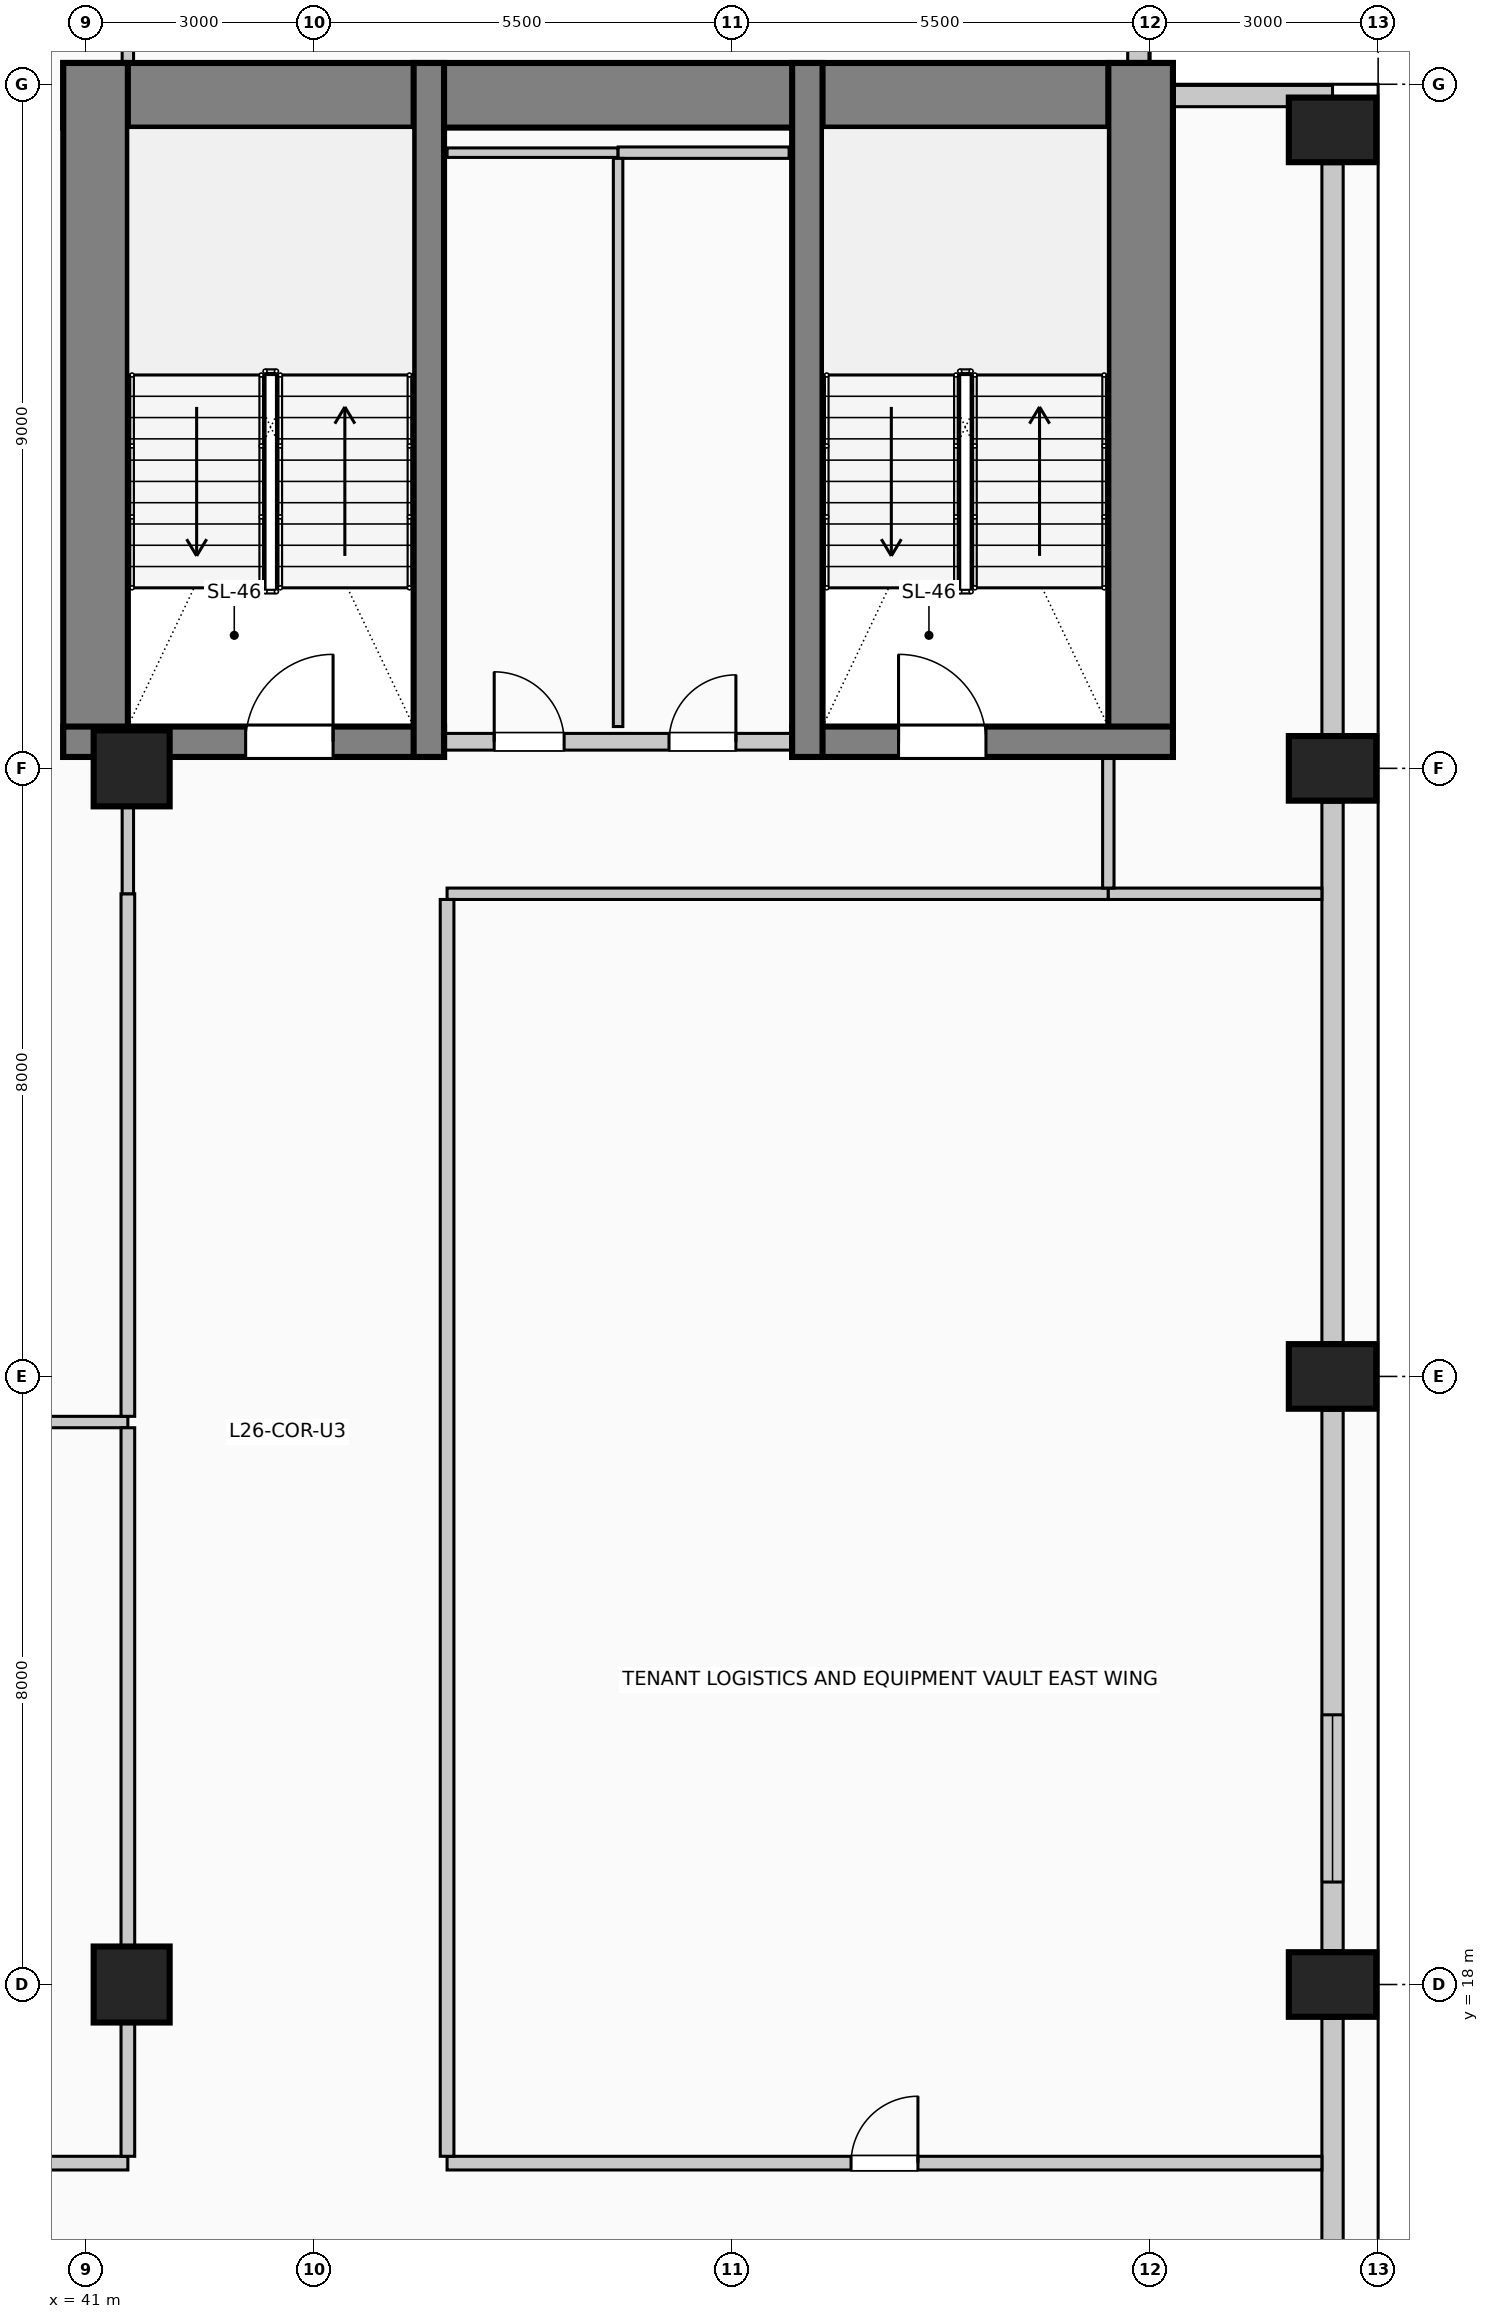
"""IFC4 building model, lengths in metres.
Left out: names, types, materials, properties, quantities, classifications, styles, units other than length and angle.
Written with IfcOpenShell. Run it as: python <this file> out.ifc"""

import sys

from ifc_helpers import new_model, si_unit, direction, frame, frame_2d, origin, origin_2d, place, context, subcontext, project, spatial, rectangle, circle, extrude, element, fill, save


model = new_model("IFC4")
c1 = context("Model", 3, precision=1e-05, world=origin(), true_north=direction((0.0, 1.0)))
c2 = subcontext(c1, "Body", "Model", "MODEL_VIEW")
j1 = project(units=[si_unit("LENGTHUNIT", "METRE"), si_unit("PLANEANGLEUNIT", "RADIAN")], contexts=[c1])
p1 = place(None, origin())
s1 = spatial("IfcSite", under=j1, at=p1, CompositionType="ELEMENT")
p2 = place(p1, origin())
s2 = spatial("IfcBuilding", under=s1, at=p2, CompositionType="ELEMENT")
p3 = place(p2, frame((0.0, 0.0, 108.6)))
s3 = spatial("IfcBuildingStorey", under=s2, at=p3, CompositionType="ELEMENT", Elevation=108.6)
p4 = place(p3, frame((40.7, 42.855, 0.0), z_axis=(0.0, 0.0, 1.0), x_axis=(1.0, 0.0, 0.0)))
e1 = element("IfcWall", 1, at=p4, inside=s3, PredefinedType="SHEAR", context=c2, shape_type="SweptSolid", body=[
    extrude(rectangle(XDim=14.6, YDim=0.85, at=frame_2d((7.3, 0.0))), origin(), (0.0, 0.0, 1.0), 4.0),
])
for number, where, z_axis, x_axis in (
    (2, (41.125, 34.15, 0.0), (0.0, 0.0, 1.0), (0.0, 1.0, 0.0)),
    (3, (54.875, 34.15, 0.0), (0.0, 0.0, 1.0), (0.0, 1.0, 0.0)),
):
    element("IfcWall", number, at=place(p3, frame(where, z_axis=z_axis, x_axis=x_axis)), inside=s3, PredefinedType="SHEAR", context=c2, shape_type="SweptSolid", body=[
        extrude(rectangle(XDim=9.13, YDim=0.85, at=frame_2d((4.565, 0.0))), origin(), (0.0, 0.0, 1.0), 4.0),
    ])
p5 = place(p3, frame((40.7, 34.35, 0.0), z_axis=(0.0, 0.0, 1.0), x_axis=(1.0, 0.0, 0.0)))
e4 = element("IfcWall", 4, at=p5, inside=s3, PredefinedType="SHEAR", context=c2, shape_type="SweptSolid", body=[
    extrude(rectangle(XDim=5.01, YDim=0.4, at=frame_2d((2.505, 0.0))), origin(), (0.0, 0.0, 1.0), 4.0),
])
p6 = place(p5, frame((2.4, 0.0, 0.0)))
e5 = element("IfcOpeningElement", 5, at=p6, cuts=e4, PredefinedType="OPENING", context=c2, shape_type="SweptSolid", body=[
    extrude(rectangle(XDim=1.15, YDim=2.2, at=frame_2d((0.575, 1.1))), frame((0.0, 0.21, 0.0), z_axis=(0.0, -1.0, 0.0), x_axis=(1.0, 0.0, 0.0)), (0.0, 0.0, 1.0), 0.42),
])
p7 = place(p3, frame((45.51, 34.15, 0.0), z_axis=(0.0, 0.0, 1.0), x_axis=(0.0, 1.0, 0.0)))
e6 = element("IfcWall", 6, at=p7, inside=s3, PredefinedType="SHEAR", context=c2, shape_type="SweptSolid", body=[
    extrude(rectangle(XDim=9.13, YDim=0.4, at=frame_2d((4.565, 0.0))), origin(), (0.0, 0.0, 1.0), 4.0),
])
p8 = place(p3, frame((50.29, 34.35, 0.0), z_axis=(0.0, 0.0, 1.0), x_axis=(1.0, 0.0, 0.0)))
e7 = element("IfcWall", 7, at=p8, inside=s3, PredefinedType="SHEAR", context=c2, shape_type="SweptSolid", body=[
    extrude(rectangle(XDim=5.01, YDim=0.4, at=frame_2d((2.505, 0.0))), origin(), (0.0, 0.0, 1.0), 4.0),
])
p9 = place(p8, frame((1.4, 0.0, 0.0)))
e8 = element("IfcOpeningElement", 8, at=p9, cuts=e7, PredefinedType="OPENING", context=c2, shape_type="SweptSolid", body=[
    extrude(rectangle(XDim=1.15, YDim=2.2, at=frame_2d((0.575, 1.1))), frame((0.0, 0.21, 0.0), z_axis=(0.0, -1.0, 0.0), x_axis=(1.0, 0.0, 0.0)), (0.0, 0.0, 1.0), 0.42),
])
p10 = place(p3, frame((50.49, 34.15, 0.0), z_axis=(0.0, 0.0, 1.0), x_axis=(0.0, 1.0, 0.0)))
e9 = element("IfcWall", 9, at=p10, inside=s3, PredefinedType="SHEAR", context=c2, shape_type="SweptSolid", body=[
    extrude(rectangle(XDim=9.13, YDim=0.4, at=frame_2d((4.565, 0.0))), origin(), (0.0, 0.0, 1.0), 4.0),
])
for number, where, z_axis, x_axis in (
    (10, (57.4, 18.0, 0.0), (0.0, 0.0, 1.0), (0.0, 1.0, 0.0)),
    (11, (57.4, 26.0, 0.0), (0.0, 0.0, 1.0), (0.0, 1.0, 0.0)),
    (12, (57.4, 34.0, 0.0), (0.0, 0.0, 1.0), (0.0, 1.0, 0.0)),
    (13, (57.4, 42.4, 0.0), (0.0, 0.0, 1.0), (0.0, 1.0, 0.0)),
):
    element("IfcColumn", number, at=place(p3, frame(where, z_axis=z_axis, x_axis=x_axis)), inside=s3, PredefinedType="COLUMN", context=c2, shape_type="SweptSolid", body=[
        extrude(rectangle(XDim=0.85, YDim=1.15, at=origin_2d()), origin(), (0.0, 0.0, 1.0), 4.0),
    ])
for number, where, z_axis, x_axis in (
    (14, (41.6, 18.0, 0.0), (0.0, 0.0, 1.0), (1.0, 0.0, 0.0)),
    (15, (41.6, 34.0, 0.0), (0.0, 0.0, 1.0), (1.0, 0.0, 0.0)),
):
    element("IfcColumn", number, at=place(p3, frame(where, z_axis=z_axis, x_axis=x_axis)), inside=s3, PredefinedType="COLUMN", context=c2, shape_type="SweptSolid", body=[
        extrude(circle(Radius=0.5, at=origin_2d()), origin(), (0.0, 0.0, 1.0), 4.0),
    ])
p11 = place(p3, frame((57.4, 17.555, 0.0), z_axis=(0.0, 0.0, 1.0), x_axis=(0.0, -1.0, 0.0)))
e16 = element("IfcWall", 16, at=p11, inside=s3, PredefinedType="SOLIDWALL", context=c2, shape_type="SweptSolid", body=[
    extrude(rectangle(XDim=7.11, YDim=0.28, at=frame_2d((3.555, 0.0))), origin(), (0.0, 0.0, 1.0), 2.875),
])
p12 = place(p3, frame((57.4, 25.555, 0.0), z_axis=(0.0, 0.0, 1.0), x_axis=(0.0, -1.0, 0.0)))
e17 = element("IfcWall", 17, at=p12, inside=s3, PredefinedType="SOLIDWALL", context=c2, shape_type="SweptSolid", body=[
    extrude(rectangle(XDim=7.11, YDim=0.28, at=frame_2d((3.555, 0.0))), origin(), (0.0, 0.0, 1.0), 2.875),
])
p13 = place(p12, frame((4.007, 0.0, 0.5)))
e18 = element("IfcOpeningElement", 18, at=p13, cuts=e17, PredefinedType="OPENING", context=c2, shape_type="SweptSolid", body=[
    extrude(rectangle(XDim=2.2, YDim=1.95, at=frame_2d((1.1, 0.975))), frame((0.0, 0.15, 0.0), z_axis=(0.0, -1.0, 0.0), x_axis=(1.0, 0.0, 0.0)), (0.0, 0.0, 1.0), 0.3),
])
p14 = place(p3, frame((57.4, 33.555, 0.0), z_axis=(0.0, 0.0, 1.0), x_axis=(0.0, -1.0, 0.0)))
e19 = element("IfcWall", 19, at=p14, inside=s3, PredefinedType="SOLIDWALL", context=c2, shape_type="SweptSolid", body=[
    extrude(rectangle(XDim=7.11, YDim=0.28, at=frame_2d((3.555, 0.0))), origin(), (0.0, 0.0, 1.0), 2.875),
])
p15 = place(p3, frame((57.4, 41.955, 0.0), z_axis=(0.0, 0.0, 1.0), x_axis=(0.0, -1.0, 0.0)))
e20 = element("IfcWall", 20, at=p15, inside=s3, PredefinedType="SOLIDWALL", context=c2, shape_type="SweptSolid", body=[
    extrude(rectangle(XDim=7.51, YDim=0.28, at=frame_2d((3.755, 0.0))), origin(), (0.0, 0.0, 1.0), 2.875),
])
p16 = place(p3, frame((54.845, 45.4, 0.0), z_axis=(0.0, 0.0, 1.0), x_axis=(0.0, -1.0, 0.0)))
e21 = element("IfcWall", 21, at=p16, inside=s3, PredefinedType="SOLIDWALL", context=c2, shape_type="SweptSolid", body=[
    extrude(rectangle(XDim=2.115, YDim=0.28, at=frame_2d((1.058, 0.0))), origin(), (0.0, 0.0, 1.0), 3.725),
])
p17 = place(p3, frame((55.305, 42.845, 0.0), z_axis=(0.0, 0.0, 1.0), x_axis=(1.0, 0.0, 0.0)))
e22 = element("IfcWall", 22, at=p17, inside=s3, PredefinedType="SOLIDWALL", context=c2, shape_type="SweptSolid", body=[
    extrude(rectangle(XDim=2.095, YDim=0.28, at=frame_2d((1.047, 0.0))), origin(), (0.0, 0.0, 1.0), 3.725),
])
p18 = place(p3, frame((45.72, 34.35, 0.0), z_axis=(0.0, 0.0, 1.0), x_axis=(1.0, 0.0, 0.0)))
e23 = element("IfcWall", 23, at=p18, inside=s3, PredefinedType="PARTITIONING", context=c2, shape_type="SweptSolid", body=[
    extrude(rectangle(XDim=4.56, YDim=0.22, at=frame_2d((2.28, 0.0))), origin(), (0.0, 0.0, 1.0), 3.725),
])
p19 = place(p18, frame((0.65, 0.0, 0.0)))
e24 = element("IfcOpeningElement", 24, at=p19, cuts=e23, PredefinedType="OPENING", context=c2, shape_type="SweptSolid", body=[
    extrude(rectangle(XDim=0.92, YDim=2.1, at=frame_2d((0.46, 1.05))), frame((0.0, 0.12, 0.0), z_axis=(0.0, -1.0, 0.0), x_axis=(1.0, 0.0, 0.0)), (0.0, 0.0, 1.0), 0.24),
])
p20 = place(p18, frame((2.95, 0.0, 0.0)))
e25 = element("IfcOpeningElement", 25, at=p20, cuts=e23, PredefinedType="OPENING", context=c2, shape_type="SweptSolid", body=[
    extrude(rectangle(XDim=0.88, YDim=2.1, at=frame_2d((0.44, 1.05))), frame((0.0, 0.12, 0.0), z_axis=(0.0, -1.0, 0.0), x_axis=(1.0, 0.0, 0.0)), (0.0, 0.0, 1.0), 0.24),
])
p21 = place(p3, frame((27.5, 15.65, 0.0), z_axis=(0.0, 0.0, 1.0), x_axis=(1.0, 0.0, 0.0)))
e26 = element("IfcWall", 26, at=p21, inside=s3, PredefinedType="PARTITIONING", context=c2, shape_type="SweptSolid", body=[
    extrude(rectangle(XDim=14.05, YDim=0.18, at=frame_2d((7.025, 0.0))), origin(), (0.0, 0.0, 1.0), 3.725),
])
p22 = place(p21, frame((6.55, 0.0, 0.0)))
e27 = element("IfcOpeningElement", 27, at=p22, cuts=e26, PredefinedType="OPENING", context=c2, shape_type="SweptSolid", body=[
    extrude(rectangle(XDim=0.95, YDim=2.15, at=frame_2d((0.475, 1.075))), frame((0.0, 0.1, 0.0), z_axis=(0.0, -1.0, 0.0), x_axis=(1.0, 0.0, 0.0)), (0.0, 0.0, 1.0), 0.2),
])
p23 = place(p3, frame((45.75, 15.65, 0.0), z_axis=(0.0, 0.0, 1.0), x_axis=(1.0, 0.0, 0.0)))
e28 = element("IfcWall", 28, at=p23, inside=s3, PredefinedType="PARTITIONING", context=c2, shape_type="SweptSolid", body=[
    extrude(rectangle(XDim=11.51, YDim=0.18, at=frame_2d((5.755, 0.0))), origin(), (0.0, 0.0, 1.0), 3.725),
])
p24 = place(p23, frame((5.315, 0.0, 0.0)))
e29 = element("IfcOpeningElement", 29, at=p24, cuts=e28, PredefinedType="OPENING", context=c2, shape_type="SweptSolid", body=[
    extrude(rectangle(XDim=0.88, YDim=2.1, at=frame_2d((0.44, 1.05))), frame((0.0, 0.1, 0.0), z_axis=(0.0, -1.0, 0.0), x_axis=(1.0, 0.0, 0.0)), (0.0, 0.0, 1.0), 0.2),
])
p25 = place(p3, frame((27.5, 25.4, 0.0), z_axis=(0.0, 0.0, 1.0), x_axis=(1.0, 0.0, 0.0)))
e30 = element("IfcWall", 30, at=p25, inside=s3, PredefinedType="PARTITIONING", context=c2, shape_type="SweptSolid", body=[
    extrude(rectangle(XDim=14.05, YDim=0.15, at=frame_2d((7.025, 0.0))), origin(), (0.0, 0.0, 1.0), 3.17),
])
p26 = place(p3, frame((45.75, 32.35, 0.0), z_axis=(0.0, 0.0, 1.0), x_axis=(1.0, 0.0, 0.0)))
e31 = element("IfcWall", 31, at=p26, inside=s3, PredefinedType="PARTITIONING", context=c2, shape_type="SweptSolid", body=[
    extrude(rectangle(XDim=8.7, YDim=0.15, at=frame_2d((4.35, 0.0))), origin(), (0.0, 0.0, 1.0), 3.725),
])
p27 = place(p3, frame((54.45, 32.35, 0.0), z_axis=(0.0, 0.0, 1.0), x_axis=(1.0, 0.0, 0.0)))
e32 = element("IfcWall", 32, at=p27, inside=s3, PredefinedType="PARTITIONING", context=c2, shape_type="SweptSolid", body=[
    extrude(rectangle(XDim=2.81, YDim=0.15, at=frame_2d((1.405, 0.0))), origin(), (0.0, 0.0, 1.0), 3.725),
])
p28 = place(p3, frame((45.75, 42.1, 0.0), z_axis=(0.0, 0.0, 1.0), x_axis=(1.0, 0.0, 0.0)))
e33 = element("IfcWall", 33, at=p28, inside=s3, PredefinedType="PARTITIONING", context=c2, shape_type="SweptSolid", body=[
    extrude(rectangle(XDim=2.25, YDim=0.125, at=frame_2d((1.125, 0.0))), origin(), (0.0, 0.0, 1.0), 3.725),
])
p29 = place(p3, frame((48.0, 42.1, 0.0), z_axis=(0.0, 0.0, 1.0), x_axis=(1.0, 0.0, 0.0)))
e34 = element("IfcWall", 34, at=p29, inside=s3, PredefinedType="PARTITIONING", context=c2, shape_type="SweptSolid", body=[
    extrude(rectangle(XDim=2.25, YDim=0.15, at=frame_2d((1.125, 0.0))), origin(), (0.0, 0.0, 1.0), 3.725),
])
p30 = place(p3, frame((41.55, 15.74, 0.0), z_axis=(0.0, 0.0, 1.0), x_axis=(0.0, 1.0, 0.0)))
e35 = element("IfcWall", 35, at=p30, inside=s3, PredefinedType="PARTITIONING", context=c2, shape_type="SweptSolid", body=[
    extrude(rectangle(XDim=1.76, YDim=0.18, at=frame_2d((0.88, 0.0))), origin(), (0.0, 0.0, 1.0), 3.07),
])
p31 = place(p3, frame((41.55, 18.5, 0.0), z_axis=(0.0, 0.0, 1.0), x_axis=(0.0, 1.0, 0.0)))
e36 = element("IfcWall", 36, at=p31, inside=s3, PredefinedType="PARTITIONING", context=c2, shape_type="SweptSolid", body=[
    extrude(rectangle(XDim=6.825, YDim=0.18, at=frame_2d((3.413, 0.0))), origin(), (0.0, 0.0, 1.0), 3.07),
])
p32 = place(p3, frame((41.55, 25.475, 0.0), z_axis=(0.0, 0.0, 1.0), x_axis=(0.0, 1.0, 0.0)))
e37 = element("IfcWall", 37, at=p32, inside=s3, PredefinedType="PARTITIONING", context=c2, shape_type="SweptSolid", body=[
    extrude(rectangle(XDim=6.875, YDim=0.18, at=frame_2d((3.438, 0.0))), origin(), (0.0, 0.0, 1.0), 3.07),
])
p33 = place(p3, frame((41.55, 32.35, 0.0), z_axis=(0.0, 0.0, 1.0), x_axis=(0.0, 1.0, 0.0)))
e38 = element("IfcWall", 38, at=p33, inside=s3, PredefinedType="PARTITIONING", context=c2, shape_type="SweptSolid", body=[
    extrude(rectangle(XDim=1.15, YDim=0.15, at=frame_2d((0.575, 0.0))), origin(), (0.0, 0.0, 1.0), 3.07),
])
p34 = place(p3, frame((41.55, 43.28, 0.0), z_axis=(0.0, 0.0, 1.0), x_axis=(0.0, 1.0, 0.0)))
e39 = element("IfcWall", 39, at=p34, inside=s3, PredefinedType="PARTITIONING", context=c2, shape_type="SweptSolid", body=[
    extrude(rectangle(XDim=1.42, YDim=0.15, at=frame_2d((0.71, 0.0))), origin(), (0.0, 0.0, 1.0), 3.725),
])
p35 = place(p3, frame((45.75, 15.74, 0.0), z_axis=(0.0, 0.0, 1.0), x_axis=(0.0, 1.0, 0.0)))
e40 = element("IfcWall", 40, at=p35, inside=s3, PredefinedType="PARTITIONING", context=c2, shape_type="SweptSolid", body=[
    extrude(rectangle(XDim=16.535, YDim=0.18, at=frame_2d((8.268, 0.0))), origin(), (0.0, 0.0, 1.0), 3.725),
])
p36 = place(p3, frame((48.0, 34.55, 0.0), z_axis=(0.0, 0.0, 1.0), x_axis=(0.0, 1.0, 0.0)))
e41 = element("IfcWall", 41, at=p36, inside=s3, PredefinedType="PARTITIONING", context=c2, shape_type="SweptSolid", body=[
    extrude(rectangle(XDim=7.475, YDim=0.125, at=frame_2d((3.737, 0.0))), origin(), (0.0, 0.0, 1.0), 3.725),
])
p37 = place(p3, frame((54.45, 32.425, 0.0), z_axis=(0.0, 0.0, 1.0), x_axis=(0.0, 1.0, 0.0)))
e42 = element("IfcWall", 42, at=p37, inside=s3, PredefinedType="PARTITIONING", context=c2, shape_type="SweptSolid", body=[
    extrude(rectangle(XDim=1.725, YDim=0.15, at=frame_2d((0.862, 0.0))), origin(), (0.0, 0.0, 1.0), 3.725),
])
p38 = place(p13, origin())
e43 = element("IfcWindow", 43, at=p38, inside=s3, PartitioningType="SINGLE_PANEL", PredefinedType="WINDOW", context=c2, shape_type="SweptSolid", body=[
    extrude(rectangle(XDim=2.2, YDim=1.95, at=frame_2d((1.1, 0.975))), frame((0.0, 0.03, 0.0), z_axis=(0.0, -1.0, 0.0), x_axis=(1.0, 0.0, 0.0)), (0.0, 0.0, 1.0), 0.06),
])
fill(e18, e43)
p39 = place(p6, origin())
e44 = element("IfcDoor", 44, at=p39, inside=s3, OperationType="SINGLE_SWING_RIGHT", PredefinedType="DOOR", context=c2, shape_type="SweptSolid", body=[
    extrude(rectangle(XDim=1.15, YDim=2.2, at=frame_2d((0.575, 1.1))), frame((0.0, 0.025, 0.0), z_axis=(0.0, -1.0, 0.0), x_axis=(1.0, 0.0, 0.0)), (0.0, 0.0, 1.0), 0.05),
])
fill(e5, e44)
p40 = place(p19, origin())
e45 = element("IfcDoor", 45, at=p40, inside=s3, OperationType="SINGLE_SWING_LEFT", PredefinedType="DOOR", context=c2, shape_type="SweptSolid", body=[
    extrude(rectangle(XDim=0.92, YDim=2.1, at=frame_2d((0.46, 1.05))), frame((0.0, 0.025, 0.0), z_axis=(0.0, -1.0, 0.0), x_axis=(1.0, 0.0, 0.0)), (0.0, 0.0, 1.0), 0.05),
])
fill(e24, e45)
p41 = place(p20, origin())
e46 = element("IfcDoor", 46, at=p41, inside=s3, OperationType="SINGLE_SWING_RIGHT", PredefinedType="DOOR", context=c2, shape_type="SweptSolid", body=[
    extrude(rectangle(XDim=0.88, YDim=2.1, at=frame_2d((0.44, 1.05))), frame((0.0, 0.025, 0.0), z_axis=(0.0, -1.0, 0.0), x_axis=(1.0, 0.0, 0.0)), (0.0, 0.0, 1.0), 0.05),
])
fill(e25, e46)
p42 = place(p9, origin())
e47 = element("IfcDoor", 47, at=p42, inside=s3, OperationType="SINGLE_SWING_LEFT", PredefinedType="DOOR", context=c2, shape_type="SweptSolid", body=[
    extrude(rectangle(XDim=1.15, YDim=2.2, at=frame_2d((0.575, 1.1))), frame((0.0, 0.025, 0.0), z_axis=(0.0, -1.0, 0.0), x_axis=(1.0, 0.0, 0.0)), (0.0, 0.0, 1.0), 0.05),
])
fill(e8, e47)
p43 = place(p24, origin())
e48 = element("IfcDoor", 48, at=p43, inside=s3, OperationType="SINGLE_SWING_RIGHT", PredefinedType="DOOR", context=c2, shape_type="SweptSolid", body=[
    extrude(rectangle(XDim=0.88, YDim=2.1, at=frame_2d((0.44, 1.05))), frame((0.0, 0.025, 0.0), z_axis=(0.0, -1.0, 0.0), x_axis=(1.0, 0.0, 0.0)), (0.0, 0.0, 1.0), 0.05),
])
fill(e29, e48)
save(model, sys.argv[1])
